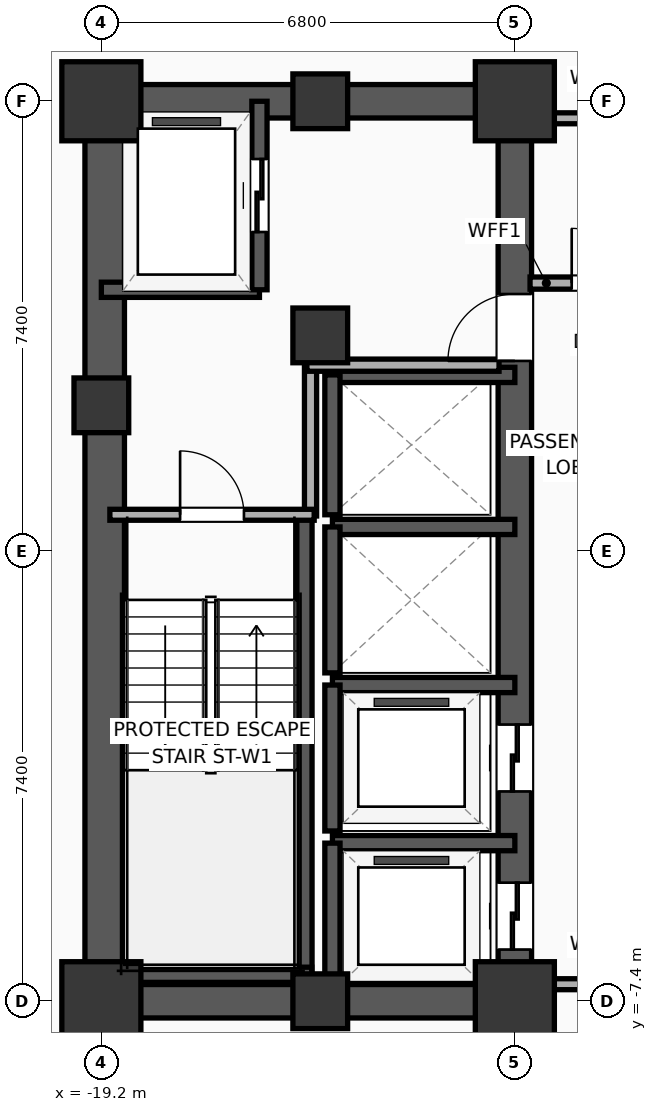
"""IFC4 building model, lengths in metres.
Left out: names, types, materials, properties, quantities, classifications, styles, units other than length and angle.
Written with IfcOpenShell. Run it as: python <this file> out.ifc"""

import sys

from ifc_helpers import new_model, si_unit, direction, frame, frame_2d, origin, origin_2d, place, context, subcontext, project, spatial, rectangle, extrude, element, fill, save


model = new_model("IFC4")
c1 = context("Model", 3, precision=1e-05, world=origin(), true_north=direction((0.0, 1.0)))
c2 = subcontext(c1, "Body", "Model", "MODEL_VIEW")
j1 = project(units=[si_unit("LENGTHUNIT", "METRE"), si_unit("PLANEANGLEUNIT", "RADIAN")], contexts=[c1])
p1 = place(None, origin())
s1 = spatial("IfcSite", under=j1, at=p1, CompositionType="ELEMENT")
p2 = place(p1, origin())
s2 = spatial("IfcBuilding", under=s1, at=p2, CompositionType="ELEMENT")
p3 = place(p2, frame((0.0, 0.0, 93.6)))
s3 = spatial("IfcBuildingStorey", under=s2, at=p3, CompositionType="ELEMENT", Elevation=93.6)
p4 = place(p3, frame((-19.2, -7.4, 0.0), z_axis=(0.0, 0.0, 1.0), x_axis=(1.0, 0.0, 0.0)))
e1 = element("IfcColumn", 1, at=p4, inside=s3, PredefinedType="COLUMN", context=c2, shape_type="SweptSolid", body=[
    extrude(rectangle(XDim=1.3, YDim=1.3, at=origin_2d()), origin(), (0.0, 0.0, 1.0), 3.9),
])
p5 = place(p3, frame((-19.2, 2.4, 0.0), z_axis=(0.0, 0.0, 1.0), x_axis=(1.0, 0.0, 0.0)))
e2 = element("IfcColumn", 2, at=p5, inside=s3, PredefinedType="COLUMN", context=c2, shape_type="SweptSolid", body=[
    extrude(rectangle(XDim=0.9, YDim=0.9, at=origin_2d()), origin(), (0.0, 0.0, 1.0), 3.9),
])
p6 = place(p3, frame((-19.2, 7.4, 0.0), z_axis=(0.0, 0.0, 1.0), x_axis=(1.0, 0.0, 0.0)))
e3 = element("IfcColumn", 3, at=p6, inside=s3, PredefinedType="COLUMN", context=c2, shape_type="SweptSolid", body=[
    extrude(rectangle(XDim=1.3, YDim=1.3, at=origin_2d()), origin(), (0.0, 0.0, 1.0), 3.9),
])
for number, where, z_axis, x_axis in (
    (4, (-15.6, -7.4, 0.0), (0.0, 0.0, 1.0), (1.0, 0.0, 0.0)),
    (5, (-15.6, 7.4, 0.0), (0.0, 0.0, 1.0), (1.0, 0.0, 0.0)),
):
    element("IfcColumn", number, at=place(p3, frame(where, z_axis=z_axis, x_axis=x_axis)), inside=s3, PredefinedType="COLUMN", context=c2, shape_type="SweptSolid", body=[
        extrude(rectangle(XDim=0.9, YDim=0.9, at=origin_2d()), origin(), (0.0, 0.0, 1.0), 3.9),
    ])
p7 = place(p3, frame((-12.4, -7.4, 0.0), z_axis=(0.0, 0.0, 1.0), x_axis=(1.0, 0.0, 0.0)))
e6 = element("IfcColumn", 6, at=p7, inside=s3, PredefinedType="COLUMN", context=c2, shape_type="SweptSolid", body=[
    extrude(rectangle(XDim=1.3, YDim=1.3, at=origin_2d()), origin(), (0.0, 0.0, 1.0), 3.9),
])
p8 = place(p3, frame((-15.6, 3.55, 0.0), z_axis=(0.0, 0.0, 1.0), x_axis=(1.0, 0.0, 0.0)))
e7 = element("IfcColumn", 7, at=p8, inside=s3, PredefinedType="COLUMN", context=c2, shape_type="SweptSolid", body=[
    extrude(rectangle(XDim=0.9, YDim=0.9, at=origin_2d()), origin(), (0.0, 0.0, 1.0), 3.9),
])
p9 = place(p3, frame((-12.4, 7.4, 0.0), z_axis=(0.0, 0.0, 1.0), x_axis=(1.0, 0.0, 0.0)))
e8 = element("IfcColumn", 8, at=p9, inside=s3, PredefinedType="COLUMN", context=c2, shape_type="SweptSolid", body=[
    extrude(rectangle(XDim=1.3, YDim=1.3, at=origin_2d()), origin(), (0.0, 0.0, 1.0), 3.9),
])
for number, where, z_axis, x_axis in (
    (9, (-19.475, -7.4, 0.0), (0.0, 0.0, 1.0), (1.0, 0.0, 0.0)),
    (10, (-19.475, 7.4, 0.0), (0.0, 0.0, 1.0), (1.0, 0.0, 0.0)),
):
    element("IfcWall", number, at=place(p3, frame(where, z_axis=z_axis, x_axis=x_axis)), inside=s3, PredefinedType="SHEAR", context=c2, shape_type="SweptSolid", body=[
        extrude(rectangle(XDim=7.35, YDim=0.55, at=frame_2d((3.675, 0.0))), origin(), (0.0, 0.0, 1.0), 3.65),
    ])
p10 = place(p3, frame((-19.145, -7.4, 0.0), z_axis=(0.0, 0.0, 1.0), x_axis=(0.0, 1.0, 0.0)))
e11 = element("IfcWall", 11, at=p10, inside=s3, PredefinedType="SHEAR", context=c2, shape_type="SweptSolid", body=[
    extrude(rectangle(XDim=14.8, YDim=0.65, at=frame_2d((7.4, 0.0))), origin(), (0.0, 0.0, 1.0), 3.65),
])
p11 = place(p3, frame((-12.4, -7.4, 0.0), z_axis=(0.0, 0.0, 1.0), x_axis=(0.0, 1.0, 0.0)))
e12 = element("IfcWall", 12, at=p11, inside=s3, PredefinedType="SHEAR", context=c2, shape_type="SweptSolid", body=[
    extrude(rectangle(XDim=14.8, YDim=0.55, at=frame_2d((7.4, 0.0))), origin(), (0.0, 0.0, 1.0), 3.65),
])
p12 = place(p11, frame((0.85, 0.0, 0.0)))
e13 = element("IfcOpeningElement", 13, at=p12, cuts=e12, PredefinedType="OPENING", context=c2, shape_type="SweptSolid", body=[
    extrude(rectangle(XDim=1.1, YDim=2.05, at=frame_2d((0.55, 1.025))), frame((0.0, 0.285, 0.0), z_axis=(0.0, -1.0, 0.0), x_axis=(1.0, 0.0, 0.0)), (0.0, 0.0, 1.0), 0.57),
])
p13 = place(p11, frame((3.45, 0.0, 0.0)))
e14 = element("IfcOpeningElement", 14, at=p13, cuts=e12, PredefinedType="OPENING", context=c2, shape_type="SweptSolid", body=[
    extrude(rectangle(XDim=1.1, YDim=2.05, at=frame_2d((0.55, 1.025))), frame((0.0, 0.285, 0.0), z_axis=(0.0, -1.0, 0.0), x_axis=(1.0, 0.0, 0.0)), (0.0, 0.0, 1.0), 0.57),
])
p14 = place(p11, frame((10.53, 0.0, 0.0)))
e15 = element("IfcOpeningElement", 15, at=p14, cuts=e12, PredefinedType="OPENING", context=c2, shape_type="SweptSolid", body=[
    extrude(rectangle(XDim=1.1, YDim=2.05, at=frame_2d((0.55, 1.025))), frame((0.0, 0.285, 0.0), z_axis=(0.0, -1.0, 0.0), x_axis=(1.0, 0.0, 0.0)), (0.0, 0.0, 1.0), 0.57),
])
p15 = place(p3, frame((-15.86, -7.085, 0.0), z_axis=(0.0, 0.0, 1.0), x_axis=(0.0, 1.0, 0.0)))
e16 = element("IfcWall", 16, at=p15, inside=s3, PredefinedType="SOLIDWALL", context=c2, shape_type="SweptSolid", body=[
    extrude(rectangle(XDim=7.685, YDim=0.25, at=frame_2d((3.843, 0.0))), origin(), (0.0, 0.0, 1.0), 3.65),
])
p16 = place(p3, frame((-19.2, -6.965, 0.0), z_axis=(0.0, 0.0, 1.0), x_axis=(1.0, 0.0, 0.0)))
e17 = element("IfcWall", 17, at=p16, inside=s3, PredefinedType="SOLIDWALL", context=c2, shape_type="SweptSolid", body=[
    extrude(rectangle(XDim=3.46, YDim=0.25, at=frame_2d((1.73, 0.0))), origin(), (0.0, 0.0, 1.0), 3.65),
])
p17 = place(p3, frame((-19.2, 4.3, 0.0), z_axis=(0.0, 0.0, 1.0), x_axis=(1.0, 0.0, 0.0)))
e18 = element("IfcWall", 18, at=p17, inside=s3, PredefinedType="SOLIDWALL", context=c2, shape_type="SweptSolid", body=[
    extrude(rectangle(XDim=2.6, YDim=0.25, at=frame_2d((1.3, 0.0))), origin(), (0.0, 0.0, 1.0), 3.65),
])
p18 = place(p3, frame((-16.6, 4.3, 0.0), z_axis=(0.0, 0.0, 1.0), x_axis=(0.0, 1.0, 0.0)))
e19 = element("IfcWall", 19, at=p18, inside=s3, PredefinedType="SOLIDWALL", context=c2, shape_type="SweptSolid", body=[
    extrude(rectangle(XDim=3.1, YDim=0.25, at=frame_2d((1.55, 0.0))), origin(), (0.0, 0.0, 1.0), 3.65),
])
p19 = place(p18, frame((0.95, 0.0, 0.0)))
e20 = element("IfcOpeningElement", 20, at=p19, cuts=e19, PredefinedType="OPENING", context=c2, shape_type="SweptSolid", body=[
    extrude(rectangle(XDim=1.2, YDim=2.05, at=frame_2d((0.6, 1.025))), frame((0.0, 0.135, 0.0), z_axis=(0.0, -1.0, 0.0), x_axis=(1.0, 0.0, 0.0)), (0.0, 0.0, 1.0), 0.27),
])
p20 = place(p3, frame((-12.4, -4.8, 0.0), z_axis=(0.0, 0.0, 1.0), x_axis=(-1.0, 0.0, 0.0)))
e21 = element("IfcWall", 21, at=p20, inside=s3, PredefinedType="SOLIDWALL", context=c2, shape_type="SweptSolid", body=[
    extrude(rectangle(XDim=3.0, YDim=0.25, at=frame_2d((1.5, 0.0))), origin(), (0.0, 0.0, 1.0), 3.65),
])
p21 = place(p3, frame((-15.4, -4.8, 0.0), z_axis=(0.0, 0.0, 1.0), x_axis=(0.0, -1.0, 0.0)))
e22 = element("IfcWall", 22, at=p21, inside=s3, PredefinedType="SOLIDWALL", context=c2, shape_type="SweptSolid", body=[
    extrude(rectangle(XDim=2.6, YDim=0.25, at=frame_2d((1.3, 0.0))), origin(), (0.0, 0.0, 1.0), 3.65),
])
p22 = place(p3, frame((-12.4, -2.2, 0.0), z_axis=(0.0, 0.0, 1.0), x_axis=(-1.0, 0.0, 0.0)))
e23 = element("IfcWall", 23, at=p22, inside=s3, PredefinedType="SOLIDWALL", context=c2, shape_type="SweptSolid", body=[
    extrude(rectangle(XDim=3.0, YDim=0.25, at=frame_2d((1.5, 0.0))), origin(), (0.0, 0.0, 1.0), 3.65),
])
p23 = place(p3, frame((-15.4, -2.2, 0.0), z_axis=(0.0, 0.0, 1.0), x_axis=(0.0, -1.0, 0.0)))
e24 = element("IfcWall", 24, at=p23, inside=s3, PredefinedType="SOLIDWALL", context=c2, shape_type="SweptSolid", body=[
    extrude(rectangle(XDim=2.4, YDim=0.25, at=frame_2d((1.2, 0.0))), origin(), (0.0, 0.0, 1.0), 3.65),
])
p24 = place(p3, frame((-12.4, 0.4, 0.0), z_axis=(0.0, 0.0, 1.0), x_axis=(-1.0, 0.0, 0.0)))
e25 = element("IfcWall", 25, at=p24, inside=s3, PredefinedType="SOLIDWALL", context=c2, shape_type="SweptSolid", body=[
    extrude(rectangle(XDim=3.0, YDim=0.25, at=frame_2d((1.5, 0.0))), origin(), (0.0, 0.0, 1.0), 3.65),
])
p25 = place(p3, frame((-15.4, 0.4, 0.0), z_axis=(0.0, 0.0, 1.0), x_axis=(0.0, -1.0, 0.0)))
e26 = element("IfcWall", 26, at=p25, inside=s3, PredefinedType="SOLIDWALL", context=c2, shape_type="SweptSolid", body=[
    extrude(rectangle(XDim=2.4, YDim=0.25, at=frame_2d((1.2, 0.0))), origin(), (0.0, 0.0, 1.0), 3.65),
])
p26 = place(p3, frame((-12.4, 2.9, 0.0), z_axis=(0.0, 0.0, 1.0), x_axis=(-1.0, 0.0, 0.0)))
e27 = element("IfcWall", 27, at=p26, inside=s3, PredefinedType="SOLIDWALL", context=c2, shape_type="SweptSolid", body=[
    extrude(rectangle(XDim=3.0, YDim=0.25, at=frame_2d((1.5, 0.0))), origin(), (0.0, 0.0, 1.0), 3.65),
])
p27 = place(p3, frame((-15.4, 2.9, 0.0), z_axis=(0.0, 0.0, 1.0), x_axis=(0.0, -1.0, 0.0)))
e28 = element("IfcWall", 28, at=p27, inside=s3, PredefinedType="SOLIDWALL", context=c2, shape_type="SweptSolid", body=[
    extrude(rectangle(XDim=2.3, YDim=0.25, at=frame_2d((1.15, 0.0))), origin(), (0.0, 0.0, 1.0), 3.65),
])
p28 = place(p3, frame((-15.76, 0.58, 0.0), z_axis=(0.0, 0.0, 1.0), x_axis=(0.0, 1.0, 0.0)))
e29 = element("IfcWall", 29, at=p28, inside=s3, PredefinedType="PARTITIONING", context=c2, shape_type="SweptSolid", body=[
    extrude(rectangle(XDim=2.52, YDim=0.2, at=frame_2d((1.26, 0.0))), origin(), (0.0, 0.0, 1.0), 3.65),
])
p29 = place(p3, frame((-15.82, 3.06, 0.0), z_axis=(0.0, 0.0, 1.0), x_axis=(1.0, 0.0, 0.0)))
e30 = element("IfcWall", 30, at=p29, inside=s3, PredefinedType="PARTITIONING", context=c2, shape_type="SweptSolid", body=[
    extrude(rectangle(XDim=3.16, YDim=0.2, at=frame_2d((1.58, 0.0))), origin(), (0.0, 0.0, 1.0), 3.65),
])
p30 = place(p3, frame((-19.06, 0.6, 0.0), z_axis=(0.0, 0.0, 1.0), x_axis=(1.0, 0.0, 0.0)))
e31 = element("IfcWall", 31, at=p30, inside=s3, PredefinedType="PARTITIONING", context=c2, shape_type="SweptSolid", body=[
    extrude(rectangle(XDim=3.36, YDim=0.18, at=frame_2d((1.68, 0.0))), origin(), (0.0, 0.0, 1.0), 3.65),
])
p31 = place(p30, frame((1.155, 0.0, 0.0)))
e32 = element("IfcOpeningElement", 32, at=p31, cuts=e31, PredefinedType="OPENING", context=c2, shape_type="SweptSolid", body=[
    extrude(rectangle(XDim=1.05, YDim=2.05, at=frame_2d((0.525, 1.025))), frame((0.0, 0.1, 0.0), z_axis=(0.0, -1.0, 0.0), x_axis=(1.0, 0.0, 0.0)), (0.0, 0.0, 1.0), 0.2),
])
p32 = place(p3, frame((-12.15, 4.41, 0.0), z_axis=(0.0, 0.0, 1.0), x_axis=(1.0, 0.0, 0.0)))
e33 = element("IfcWall", 33, at=p32, inside=s3, PredefinedType="PARTITIONING", context=c2, shape_type="SweptSolid", body=[
    extrude(rectangle(XDim=2.27, YDim=0.2, at=frame_2d((1.135, 0.0))), origin(), (0.0, 0.0, 1.0), 3.65),
])
p33 = place(p32, frame((0.685, 0.0, 0.0)))
e34 = element("IfcOpeningElement", 34, at=p33, cuts=e33, PredefinedType="OPENING", context=c2, shape_type="SweptSolid", body=[
    extrude(rectangle(XDim=0.9, YDim=2.05, at=frame_2d((0.45, 1.025))), frame((0.0, 0.11, 0.0), z_axis=(0.0, -1.0, 0.0), x_axis=(1.0, 0.0, 0.0)), (0.0, 0.0, 1.0), 0.22),
])
for number, where, z_axis, x_axis in (
    (35, (-12.15, 7.12, 0.0), (0.0, 0.0, 1.0), (1.0, 0.0, 0.0)),
    (36, (-12.15, -7.12, 0.0), (0.0, 0.0, 1.0), (1.0, 0.0, 0.0)),
):
    element("IfcWall", number, at=place(p3, frame(where, z_axis=z_axis, x_axis=x_axis)), inside=s3, PredefinedType="PARTITIONING", context=c2, shape_type="SweptSolid", body=[
        extrude(rectangle(XDim=2.27, YDim=0.18, at=frame_2d((1.135, 0.0))), origin(), (0.0, 0.0, 1.0), 3.65),
    ])
p34 = place(p19, origin())
e37 = element("IfcDoor", 37, at=p34, inside=s3, OperationType="SLIDING_TO_LEFT", PredefinedType="DOOR", context=c2, shape_type="SweptSolid", body=[
    extrude(rectangle(XDim=1.2, YDim=2.05, at=frame_2d((0.6, 1.025))), frame((0.0, 0.025, 0.0), z_axis=(0.0, -1.0, 0.0), x_axis=(1.0, 0.0, 0.0)), (0.0, 0.0, 1.0), 0.05),
])
fill(e20, e37)
p35 = place(p12, origin())
e38 = element("IfcDoor", 38, at=p35, inside=s3, OperationType="SLIDING_TO_LEFT", PredefinedType="DOOR", context=c2, shape_type="SweptSolid", body=[
    extrude(rectangle(XDim=1.1, YDim=2.05, at=frame_2d((0.55, 1.025))), frame((0.0, 0.025, 0.0), z_axis=(0.0, -1.0, 0.0), x_axis=(1.0, 0.0, 0.0)), (0.0, 0.0, 1.0), 0.05),
])
fill(e13, e38)
p36 = place(p13, origin())
e39 = element("IfcDoor", 39, at=p36, inside=s3, OperationType="SLIDING_TO_LEFT", PredefinedType="DOOR", context=c2, shape_type="SweptSolid", body=[
    extrude(rectangle(XDim=1.1, YDim=2.05, at=frame_2d((0.55, 1.025))), frame((0.0, 0.025, 0.0), z_axis=(0.0, -1.0, 0.0), x_axis=(1.0, 0.0, 0.0)), (0.0, 0.0, 1.0), 0.05),
])
fill(e14, e39)
p37 = place(p31, origin())
e40 = element("IfcDoor", 40, at=p37, inside=s3, OperationType="SINGLE_SWING_LEFT", PredefinedType="DOOR", context=c2, shape_type="SweptSolid", body=[
    extrude(rectangle(XDim=1.05, YDim=2.05, at=frame_2d((0.525, 1.025))), frame((0.0, 0.025, 0.0), z_axis=(0.0, -1.0, 0.0), x_axis=(1.0, 0.0, 0.0)), (0.0, 0.0, 1.0), 0.05),
])
fill(e32, e40)
p38 = place(p33, origin())
e41 = element("IfcDoor", 41, at=p38, inside=s3, OperationType="SINGLE_SWING_LEFT", PredefinedType="DOOR", context=c2, shape_type="SweptSolid", body=[
    extrude(rectangle(XDim=0.9, YDim=2.05, at=frame_2d((0.45, 1.025))), frame((0.0, 0.025, 0.0), z_axis=(0.0, -1.0, 0.0), x_axis=(1.0, 0.0, 0.0)), (0.0, 0.0, 1.0), 0.05),
])
fill(e34, e41)
p39 = place(p14, origin())
e42 = element("IfcDoor", 42, at=p39, inside=s3, OperationType="SINGLE_SWING_LEFT", PredefinedType="DOOR", context=c2, shape_type="SweptSolid", body=[
    extrude(rectangle(XDim=1.1, YDim=2.05, at=frame_2d((0.55, 1.025))), frame((0.0, 0.025, 0.0), z_axis=(0.0, -1.0, 0.0), x_axis=(1.0, 0.0, 0.0)), (0.0, 0.0, 1.0), 0.05),
])
fill(e15, e42)
save(model, sys.argv[1])
